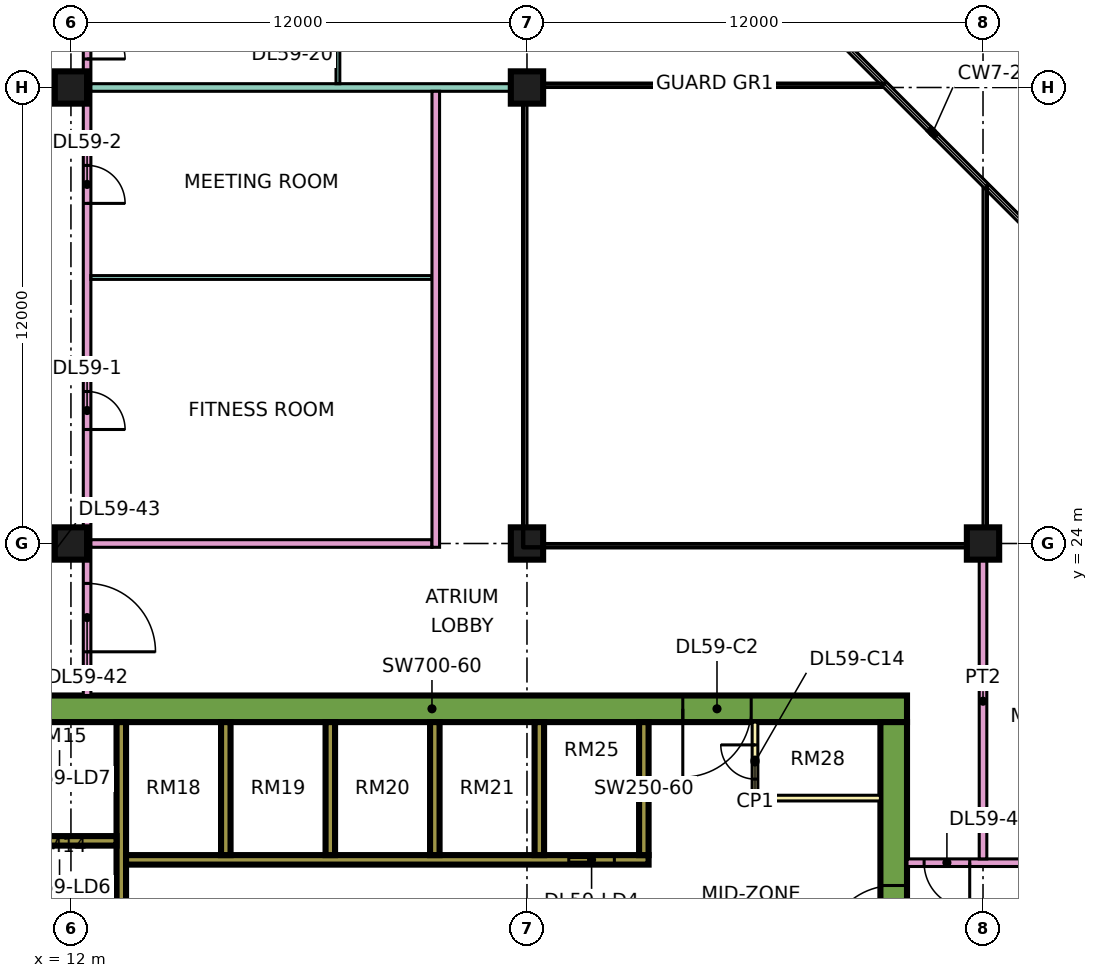
"""IFC4 building model, lengths in metres.
Left out: names, types, materials, properties, quantities, classifications, styles, units other than length and angle.
Written with IfcOpenShell. Run it as: python <this file> out.ifc"""

import sys

from ifc_helpers import new_model, si_unit, direction, frame, frame_2d, origin, origin_2d, place, context, subcontext, project, spatial, rectangle, extrude, element, fill, save


model = new_model("IFC4")
c1 = context("Model", 3, precision=1e-05, world=origin(), true_north=direction((0.0, 1.0)))
c2 = subcontext(c1, "Body", "Model", "MODEL_VIEW")
j1 = project(units=[si_unit("LENGTHUNIT", "METRE"), si_unit("PLANEANGLEUNIT", "RADIAN")], contexts=[c1])
p1 = place(None, origin())
s1 = spatial("IfcSite", under=j1, at=p1, CompositionType="ELEMENT")
p2 = place(p1, origin())
s2 = spatial("IfcBuilding", under=s1, at=p2, CompositionType="ELEMENT")
p3 = place(p2, frame((0.0, 0.0, 249.15)))
s3 = spatial("IfcBuildingStorey", under=s2, at=p3, CompositionType="ELEMENT", Elevation=249.15)
for number, where, z_axis, x_axis in (
    (1, (12.0, 24.0, 0.0), (0.0, 0.0, 1.0), (1.0, 0.0, 0.0)),
    (2, (12.0, 36.0, 0.0), (0.0, 0.0, 1.0), (1.0, 0.0, 0.0)),
    (3, (24.0, 24.0, 0.0), (0.0, 0.0, 1.0), (1.0, 0.0, 0.0)),
    (4, (24.0, 36.0, 0.0), (0.0, 0.0, 1.0), (1.0, 0.0, 0.0)),
    (5, (36.0, 24.0, 0.0), (0.0, 0.0, 1.0), (1.0, 0.0, 0.0)),
):
    element("IfcColumn", number, at=place(p3, frame(where, z_axis=z_axis, x_axis=x_axis)), inside=s3, PredefinedType="COLUMN", context=c2, shape_type="SweptSolid", body=[
        extrude(rectangle(XDim=0.85, YDim=0.85, at=origin_2d()), origin(), (0.0, 0.0, 1.0), 3.75),
    ])
p4 = place(p3, frame((9.0, 19.65, 0.0), z_axis=(0.0, 0.0, 1.0), x_axis=(1.0, 0.0, 0.0)))
e6 = element("IfcWall", 6, at=p4, inside=s3, PredefinedType="SHEAR", context=c2, shape_type="SweptSolid", body=[
    extrude(rectangle(XDim=25.0, YDim=0.7, at=frame_2d((12.5, 0.0))), origin(), (0.0, 0.0, 1.0), 3.75),
])
p5 = place(p4, frame((19.1, 0.0, 0.0)))
e7 = element("IfcOpeningElement", 7, at=p5, cuts=e6, PredefinedType="OPENING", context=c2, shape_type="SweptSolid", body=[
    extrude(rectangle(XDim=1.8, YDim=2.4, at=frame_2d((0.9, 1.2))), frame((0.0, 0.36, 0.0), z_axis=(0.0, -1.0, 0.0), x_axis=(1.0, 0.0, 0.0)), (0.0, 0.0, 1.0), 0.72),
])
p6 = place(p3, frame((33.65, 7.7, 0.0), z_axis=(0.0, 0.0, 1.0), x_axis=(0.0, 1.0, 0.0)))
e8 = element("IfcWall", 8, at=p6, inside=s3, PredefinedType="SHEAR", context=c2, shape_type="SweptSolid", body=[
    extrude(rectangle(XDim=11.6, YDim=0.7, at=frame_2d((5.8, 0.0))), origin(), (0.0, 0.0, 1.0), 3.75),
])
p7 = place(p6, frame((5.5, 0.0, 0.0)))
e9 = element("IfcOpeningElement", 9, at=p7, cuts=e8, PredefinedType="OPENING", context=c2, shape_type="SweptSolid", body=[
    extrude(rectangle(XDim=1.8, YDim=2.4, at=frame_2d((0.9, 1.2))), frame((0.0, 0.36, 0.0), z_axis=(0.0, -1.0, 0.0), x_axis=(1.0, 0.0, 0.0)), (0.0, 0.0, 1.0), 0.72),
])
p8 = place(p3, frame((13.325, 7.7, 0.0), z_axis=(0.0, 0.0, 1.0), x_axis=(0.0, 1.0, 0.0)))
e10 = element("IfcWall", 10, at=p8, inside=s3, PredefinedType="SHEAR", context=c2, shape_type="SweptSolid", body=[
    extrude(rectangle(XDim=11.6, YDim=0.25, at=frame_2d((5.8, 0.0))), origin(), (0.0, 0.0, 1.0), 3.75),
])
p9 = place(p3, frame((13.45, 15.675, 0.0), z_axis=(0.0, 0.0, 1.0), x_axis=(1.0, 0.0, 0.0)))
e11 = element("IfcWall", 11, at=p9, inside=s3, PredefinedType="SHEAR", context=c2, shape_type="SweptSolid", body=[
    extrude(rectangle(XDim=13.75, YDim=0.25, at=frame_2d((6.875, 0.0))), origin(), (0.0, 0.0, 1.0), 3.75),
])
p10 = place(p9, frame((11.65, 0.0, 0.0)))
e12 = element("IfcOpeningElement", 12, at=p10, cuts=e11, PredefinedType="OPENING", context=c2, shape_type="SweptSolid", body=[
    extrude(rectangle(XDim=1.2, YDim=2.2, at=frame_2d((0.6, 1.1))), frame((0.0, 0.135, 0.0), z_axis=(0.0, -1.0, 0.0), x_axis=(1.0, 0.0, 0.0)), (0.0, 0.0, 1.0), 0.27),
])
p11 = place(p3, frame((10.2, 16.175, 0.0), z_axis=(0.0, 0.0, 1.0), x_axis=(1.0, 0.0, 0.0)))
e13 = element("IfcWall", 13, at=p11, inside=s3, PredefinedType="SHEAR", context=c2, shape_type="SweptSolid", body=[
    extrude(rectangle(XDim=3.0, YDim=0.25, at=frame_2d((1.5, 0.0))), origin(), (0.0, 0.0, 1.0), 3.75),
])
for number, where, z_axis, x_axis in (
    (14, (16.075, 15.8, 0.0), (0.0, 0.0, 1.0), (0.0, 1.0, 0.0)),
    (15, (18.825, 15.8, 0.0), (0.0, 0.0, 1.0), (0.0, 1.0, 0.0)),
    (16, (21.575, 15.8, 0.0), (0.0, 0.0, 1.0), (0.0, 1.0, 0.0)),
    (17, (24.325, 15.8, 0.0), (0.0, 0.0, 1.0), (0.0, 1.0, 0.0)),
    (18, (27.075, 15.8, 0.0), (0.0, 0.0, 1.0), (0.0, 1.0, 0.0)),
):
    element("IfcWall", number, at=place(p3, frame(where, z_axis=z_axis, x_axis=x_axis)), inside=s3, PredefinedType="SHEAR", context=c2, shape_type="SweptSolid", body=[
        extrude(rectangle(XDim=3.5, YDim=0.25, at=frame_2d((1.75, 0.0))), origin(), (0.0, 0.0, 1.0), 3.75),
    ])
p12 = place(p3, frame((30.0, 17.3, 0.0), z_axis=(0.0, 0.0, 1.0), x_axis=(0.0, 1.0, 0.0)))
e19 = element("IfcWall", 19, at=p12, inside=s3, PredefinedType="PARTITIONING", context=c2, shape_type="SweptSolid", body=[
    extrude(rectangle(XDim=2.0, YDim=0.15, at=frame_2d((1.0, 0.0))), origin(), (0.0, 0.0, 1.0), 3.35),
])
p13 = place(p12, frame((0.5, 0.0, 0.0)))
e20 = element("IfcOpeningElement", 20, at=p13, cuts=e19, PredefinedType="OPENING", context=c2, shape_type="SweptSolid", body=[
    extrude(rectangle(XDim=0.9, YDim=2.1, at=frame_2d((0.45, 1.05))), frame((0.0, 0.085, 0.0), z_axis=(0.0, -1.0, 0.0), x_axis=(1.0, 0.0, 0.0)), (0.0, 0.0, 1.0), 0.17),
])
p14 = place(p3, frame((30.0, 17.3, 0.0), z_axis=(0.0, 0.0, 1.0), x_axis=(1.0, 0.0, 0.0)))
e21 = element("IfcWall", 21, at=p14, inside=s3, PredefinedType="PARTITIONING", context=c2, shape_type="SweptSolid", body=[
    extrude(rectangle(XDim=3.3, YDim=0.15, at=frame_2d((1.65, 0.0))), origin(), (0.0, 0.0, 1.0), 3.35),
])
p15 = place(p3, frame((12.425, 20.0, 0.0), z_axis=(0.0, 0.0, 1.0), x_axis=(0.0, 1.0, 0.0)))
e22 = element("IfcWall", 22, at=p15, inside=s3, PredefinedType="PARTITIONING", context=c2, shape_type="SweptSolid", body=[
    extrude(rectangle(XDim=42.926, YDim=0.2, at=frame_2d((21.463, 0.0))), origin(), (0.0, 0.0, 1.0), 3.35),
])
p16 = place(p15, frame((7.0, 0.0, 0.0)))
e23 = element("IfcOpeningElement", 23, at=p16, cuts=e22, PredefinedType="OPENING", context=c2, shape_type="SweptSolid", body=[
    extrude(rectangle(XDim=1.0, YDim=2.1, at=frame_2d((0.5, 1.05))), frame((0.0, 0.11, 0.0), z_axis=(0.0, -1.0, 0.0), x_axis=(1.0, 0.0, 0.0)), (0.0, 0.0, 1.0), 0.22),
])
p17 = place(p15, frame((12.95, 0.0, 0.0)))
e24 = element("IfcOpeningElement", 24, at=p17, cuts=e22, PredefinedType="OPENING", context=c2, shape_type="SweptSolid", body=[
    extrude(rectangle(XDim=1.0, YDim=2.1, at=frame_2d((0.5, 1.05))), frame((0.0, 0.11, 0.0), z_axis=(0.0, -1.0, 0.0), x_axis=(1.0, 0.0, 0.0)), (0.0, 0.0, 1.0), 0.22),
])
p18 = place(p15, frame((16.75, 0.0, 0.0)))
e25 = element("IfcOpeningElement", 25, at=p18, cuts=e22, PredefinedType="OPENING", context=c2, shape_type="SweptSolid", body=[
    extrude(rectangle(XDim=1.0, YDim=2.1, at=frame_2d((0.5, 1.05))), frame((0.0, 0.11, 0.0), z_axis=(0.0, -1.0, 0.0), x_axis=(1.0, 0.0, 0.0)), (0.0, 0.0, 1.0), 0.22),
])
p19 = place(p15, frame((34.9, 0.0, 0.0)))
e26 = element("IfcOpeningElement", 26, at=p19, cuts=e22, PredefinedType="OPENING", context=c2, shape_type="SweptSolid", body=[
    extrude(rectangle(XDim=1.0, YDim=2.1, at=frame_2d((0.5, 1.05))), frame((0.0, 0.11, 0.0), z_axis=(0.0, -1.0, 0.0), x_axis=(1.0, 0.0, 0.0)), (0.0, 0.0, 1.0), 0.22),
])
p20 = place(p15, frame((1.15, 0.0, 0.0)))
e27 = element("IfcOpeningElement", 27, at=p20, cuts=e22, PredefinedType="OPENING", context=c2, shape_type="SweptSolid", body=[
    extrude(rectangle(XDim=1.8, YDim=2.1, at=frame_2d((0.9, 1.05))), frame((0.0, 0.11, 0.0), z_axis=(0.0, -1.0, 0.0), x_axis=(1.0, 0.0, 0.0)), (0.0, 0.0, 1.0), 0.22),
])
p21 = place(p15, frame((28.6, 0.0, 0.0)))
e28 = element("IfcOpeningElement", 28, at=p21, cuts=e22, PredefinedType="OPENING", context=c2, shape_type="SweptSolid", body=[
    extrude(rectangle(XDim=1.8, YDim=2.1, at=frame_2d((0.9, 1.05))), frame((0.0, 0.11, 0.0), z_axis=(0.0, -1.0, 0.0), x_axis=(1.0, 0.0, 0.0)), (0.0, 0.0, 1.0), 0.22),
])
p22 = place(p3, frame((12.525, 24.0, 0.0), z_axis=(0.0, 0.0, 1.0), x_axis=(1.0, 0.0, 0.0)))
e29 = element("IfcWall", 29, at=p22, inside=s3, PredefinedType="PARTITIONING", context=c2, shape_type="SweptSolid", body=[
    extrude(rectangle(XDim=8.975, YDim=0.2, at=frame_2d((4.488, 0.0))), origin(), (0.0, 0.0, 1.0), 3.35),
])
p23 = place(p3, frame((12.525, 31.0, 0.0), z_axis=(0.0, 0.0, 1.0), x_axis=(1.0, 0.0, 0.0)))
e30 = element("IfcWall", 30, at=p23, inside=s3, PredefinedType="PARTITIONING", context=c2, shape_type="SweptSolid", body=[
    extrude(rectangle(XDim=8.975, YDim=0.1, at=frame_2d((4.488, 0.0))), origin(), (0.0, 0.0, 1.0), 3.35),
])
p24 = place(p3, frame((12.525, 36.0, 0.0), z_axis=(0.0, 0.0, 1.0), x_axis=(1.0, 0.0, 0.0)))
e31 = element("IfcWall", 31, at=p24, inside=s3, PredefinedType="PARTITIONING", context=c2, shape_type="SweptSolid", body=[
    extrude(rectangle(XDim=11.475, YDim=0.2, at=frame_2d((5.738, 0.0))), origin(), (0.0, 0.0, 1.0), 3.35),
])
p25 = place(p3, frame((19.025, 36.1, 0.0), z_axis=(0.0, 0.0, 1.0), x_axis=(0.0, 1.0, 0.0)))
e32 = element("IfcWall", 32, at=p25, inside=s3, PredefinedType="PARTITIONING", context=c2, shape_type="SweptSolid", body=[
    extrude(rectangle(XDim=2.85, YDim=0.1, at=frame_2d((1.425, 0.0))), origin(), (0.0, 0.0, 1.0), 3.35),
])
p26 = place(p25, frame((0.95, 0.0, 0.0)))
e33 = element("IfcOpeningElement", 33, at=p26, cuts=e32, PredefinedType="OPENING", context=c2, shape_type="SweptSolid", body=[
    extrude(rectangle(XDim=0.9, YDim=2.1, at=frame_2d((0.45, 1.05))), frame((0.0, 0.06, 0.0), z_axis=(0.0, -1.0, 0.0), x_axis=(1.0, 0.0, 0.0)), (0.0, 0.0, 1.0), 0.12),
])
p27 = place(p3, frame((21.6, 23.9, 0.0), z_axis=(0.0, 0.0, 1.0), x_axis=(0.0, 1.0, 0.0)))
e34 = element("IfcWall", 34, at=p27, inside=s3, PredefinedType="PARTITIONING", context=c2, shape_type="SweptSolid", body=[
    extrude(rectangle(XDim=12.0, YDim=0.2, at=frame_2d((6.0, 0.0))), origin(), (0.0, 0.0, 1.0), 3.35),
])
p28 = place(p3, frame((34.0, 15.6, 0.0), z_axis=(0.0, 0.0, 1.0), x_axis=(1.0, 0.0, 0.0)))
e35 = element("IfcWall", 35, at=p28, inside=s3, PredefinedType="PARTITIONING", context=c2, shape_type="SweptSolid", body=[
    extrude(rectangle(XDim=10.35, YDim=0.2, at=frame_2d((5.175, 0.0))), origin(), (0.0, 0.0, 1.0), 3.35),
])
p29 = place(p28, frame((5.6, 0.0, 0.0)))
e36 = element("IfcOpeningElement", 36, at=p29, cuts=e35, PredefinedType="OPENING", context=c2, shape_type="SweptSolid", body=[
    extrude(rectangle(XDim=1.0, YDim=2.1, at=frame_2d((0.5, 1.05))), frame((0.0, 0.11, 0.0), z_axis=(0.0, -1.0, 0.0), x_axis=(1.0, 0.0, 0.0)), (0.0, 0.0, 1.0), 0.22),
])
p30 = place(p28, frame((0.45, 0.0, 0.0)))
e37 = element("IfcOpeningElement", 37, at=p30, cuts=e35, PredefinedType="OPENING", context=c2, shape_type="SweptSolid", body=[
    extrude(rectangle(XDim=1.2, YDim=2.1, at=frame_2d((0.6, 1.05))), frame((0.0, 0.11, 0.0), z_axis=(0.0, -1.0, 0.0), x_axis=(1.0, 0.0, 0.0)), (0.0, 0.0, 1.0), 0.22),
])
p31 = place(p3, frame((36.0, 15.7, 0.0), z_axis=(0.0, 0.0, 1.0), x_axis=(0.0, 1.0, 0.0)))
e38 = element("IfcWall", 38, at=p31, inside=s3, PredefinedType="PARTITIONING", context=c2, shape_type="SweptSolid", body=[
    extrude(rectangle(XDim=8.3, YDim=0.2, at=frame_2d((4.15, 0.0))), origin(), (0.0, 0.0, 1.0), 3.35),
])
p32 = place(p10, origin())
e39 = element("IfcDoor", 39, at=p32, inside=s3, OperationType="DOUBLE_DOOR_SLIDING", PredefinedType="DOOR", context=c2, shape_type="SweptSolid", body=[
    extrude(rectangle(XDim=1.2, YDim=2.2, at=frame_2d((0.6, 1.1))), frame((0.0, 0.025, 0.0), z_axis=(0.0, -1.0, 0.0), x_axis=(1.0, 0.0, 0.0)), (0.0, 0.0, 1.0), 0.05),
])
fill(e12, e39)
p33 = place(p7, origin())
e40 = element("IfcDoor", 40, at=p33, inside=s3, OperationType="DOUBLE_DOOR_SINGLE_SWING", PredefinedType="DOOR", context=c2, shape_type="SweptSolid", body=[
    extrude(rectangle(XDim=1.8, YDim=2.4, at=frame_2d((0.9, 1.2))), frame((0.0, 0.025, 0.0), z_axis=(0.0, -1.0, 0.0), x_axis=(1.0, 0.0, 0.0)), (0.0, 0.0, 1.0), 0.05),
])
fill(e9, e40)
p34 = place(p5, frame((1.8, 0.0, 0.0), z_axis=(0.0, 0.0, 1.0), x_axis=(-1.0, 0.0, 0.0)))
e41 = element("IfcDoor", 41, at=p34, inside=s3, OperationType="DOUBLE_DOOR_SINGLE_SWING", PredefinedType="DOOR", context=c2, shape_type="SweptSolid", body=[
    extrude(rectangle(XDim=1.8, YDim=2.4, at=frame_2d((0.9, 1.2))), frame((0.0, 0.025, 0.0), z_axis=(0.0, -1.0, 0.0), x_axis=(1.0, 0.0, 0.0)), (0.0, 0.0, 1.0), 0.05),
])
fill(e7, e41)
p35 = place(p13, frame((0.9, 0.0, 0.0), z_axis=(0.0, 0.0, 1.0), x_axis=(-1.0, 0.0, 0.0)))
e42 = element("IfcDoor", 42, at=p35, inside=s3, OperationType="SINGLE_SWING_RIGHT", PredefinedType="DOOR", context=c2, shape_type="SweptSolid", body=[
    extrude(rectangle(XDim=0.9, YDim=2.1, at=frame_2d((0.45, 1.05))), frame((0.0, 0.025, 0.0), z_axis=(0.0, -1.0, 0.0), x_axis=(1.0, 0.0, 0.0)), (0.0, 0.0, 1.0), 0.05),
])
fill(e20, e42)
p36 = place(p16, frame((1.0, 0.0, 0.0), z_axis=(0.0, 0.0, 1.0), x_axis=(-1.0, 0.0, 0.0)))
e43 = element("IfcDoor", 43, at=p36, inside=s3, OperationType="SINGLE_SWING_LEFT", PredefinedType="DOOR", context=c2, shape_type="SweptSolid", body=[
    extrude(rectangle(XDim=1.0, YDim=2.1, at=frame_2d((0.5, 1.05))), frame((0.0, 0.025, 0.0), z_axis=(0.0, -1.0, 0.0), x_axis=(1.0, 0.0, 0.0)), (0.0, 0.0, 1.0), 0.05),
])
fill(e23, e43)
p37 = place(p17, frame((1.0, 0.0, 0.0), z_axis=(0.0, 0.0, 1.0), x_axis=(-1.0, 0.0, 0.0)))
e44 = element("IfcDoor", 44, at=p37, inside=s3, OperationType="SINGLE_SWING_LEFT", PredefinedType="DOOR", context=c2, shape_type="SweptSolid", body=[
    extrude(rectangle(XDim=1.0, YDim=2.1, at=frame_2d((0.5, 1.05))), frame((0.0, 0.025, 0.0), z_axis=(0.0, -1.0, 0.0), x_axis=(1.0, 0.0, 0.0)), (0.0, 0.0, 1.0), 0.05),
])
fill(e24, e44)
p38 = place(p18, frame((1.0, 0.0, 0.0), z_axis=(0.0, 0.0, 1.0), x_axis=(-1.0, 0.0, 0.0)))
e45 = element("IfcDoor", 45, at=p38, inside=s3, OperationType="SINGLE_SWING_LEFT", PredefinedType="DOOR", context=c2, shape_type="SweptSolid", body=[
    extrude(rectangle(XDim=1.0, YDim=2.1, at=frame_2d((0.5, 1.05))), frame((0.0, 0.025, 0.0), z_axis=(0.0, -1.0, 0.0), x_axis=(1.0, 0.0, 0.0)), (0.0, 0.0, 1.0), 0.05),
])
fill(e25, e45)
p39 = place(p30, origin())
e46 = element("IfcDoor", 46, at=p39, inside=s3, OperationType="SINGLE_SWING_RIGHT", PredefinedType="DOOR", context=c2, shape_type="SweptSolid", body=[
    extrude(rectangle(XDim=1.2, YDim=2.1, at=frame_2d((0.6, 1.05))), frame((0.0, 0.025, 0.0), z_axis=(0.0, -1.0, 0.0), x_axis=(1.0, 0.0, 0.0)), (0.0, 0.0, 1.0), 0.05),
])
fill(e37, e46)
p40 = place(p20, frame((1.8, 0.0, 0.0), z_axis=(0.0, 0.0, 1.0), x_axis=(-1.0, 0.0, 0.0)))
e47 = element("IfcDoor", 47, at=p40, inside=s3, OperationType="DOUBLE_DOOR_SINGLE_SWING", PredefinedType="DOOR", context=c2, shape_type="SweptSolid", body=[
    extrude(rectangle(XDim=1.8, YDim=2.1, at=frame_2d((0.9, 1.05))), frame((0.0, 0.025, 0.0), z_axis=(0.0, -1.0, 0.0), x_axis=(1.0, 0.0, 0.0)), (0.0, 0.0, 1.0), 0.05),
])
fill(e27, e47)
save(model, sys.argv[1])
